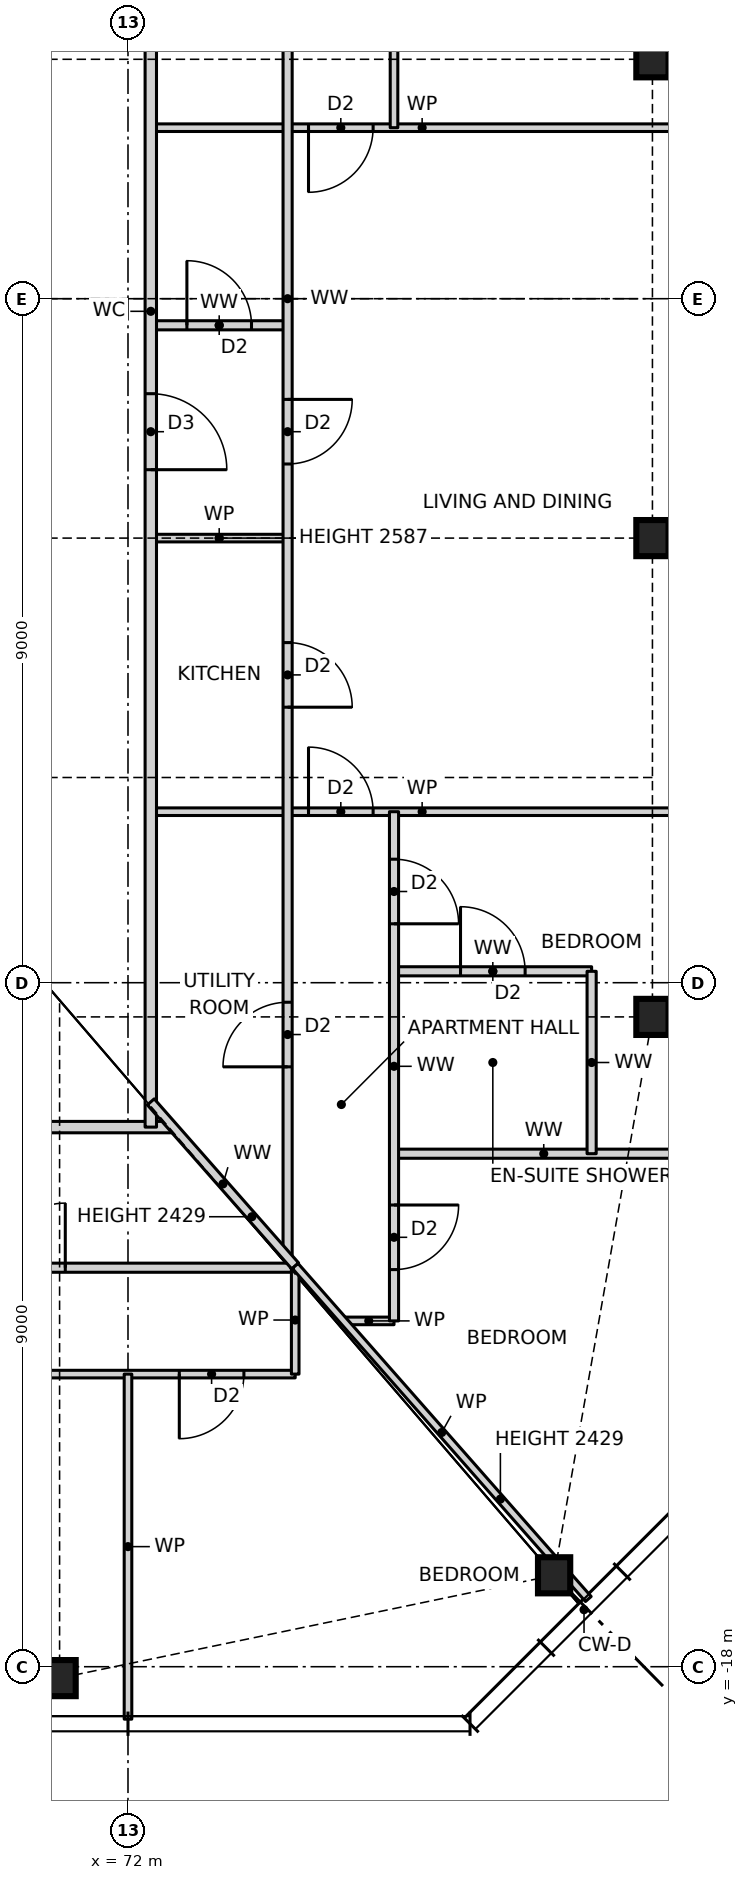
"""IFC4 building model, lengths in metres.
Left out: names, types, materials, properties, quantities, classifications, styles, units other than length and angle.
Written with IfcOpenShell. Run it as: python <this file> out.ifc"""

import sys

from ifc_helpers import new_model, si_unit, direction, frame, frame_2d, origin, origin_2d, place, context, subcontext, project, spatial, rectangle, i_section, extrude, element, fill, save


model = new_model("IFC4")
c1 = context("Model", 3, precision=1e-05, world=origin(), true_north=direction((0.0, 1.0)))
c2 = subcontext(c1, "Body", "Model", "MODEL_VIEW")
j1 = project(units=[si_unit("LENGTHUNIT", "METRE"), si_unit("PLANEANGLEUNIT", "RADIAN")], contexts=[c1])
p1 = place(None, origin())
s1 = spatial("IfcSite", under=j1, at=p1, CompositionType="ELEMENT")
p2 = place(p1, origin())
s2 = spatial("IfcBuilding", under=s1, at=p2, CompositionType="ELEMENT")
p3 = place(p2, frame((0.0, 0.0, 15.0)))
s3 = spatial("IfcBuildingStorey", under=s2, at=p3, CompositionType="ELEMENT", Elevation=15.0)
for number, where, z_axis, x_axis in (
    (1, (71.1, -18.15, 0.0), (0.0, 0.0, 1.0), (1.0, 0.0, 0.0)),
    (2, (77.606, -16.797, 0.0), (0.0, 0.0, 1.0), (1.0, 0.0, 0.0)),
    (3, (78.9, -9.45, 0.0), (0.0, 0.0, 1.0), (1.0, 0.0, 0.0)),
    (4, (78.9, -3.15, 0.0), (0.0, 0.0, 1.0), (1.0, 0.0, 0.0)),
    (5, (78.9, 3.15, 0.0), (0.0, 0.0, 1.0), (1.0, 0.0, 0.0)),
):
    element("IfcColumn", number, at=place(p3, frame(where, z_axis=z_axis, x_axis=x_axis)), inside=s3, PredefinedType="COLUMN", context=c2, shape_type="SweptSolid", body=[
        extrude(i_section(OverallWidth=0.424, OverallDepth=0.475, WebThickness=0.048, FlangeThickness=0.077, at=origin_2d()), origin(), (0.0, 0.0, 1.0), 3.5),
    ])
p4 = place(p3, frame((63.0, -14.15, 0.0), z_axis=(0.0, 0.0, 1.0), x_axis=(1.0, 0.0, 0.0)))
e6 = element("IfcWall", 6, at=p4, inside=s3, PredefinedType="PARTITIONING", context=c2, shape_type="SweptSolid", body=[
    extrude(rectangle(XDim=11.2, YDim=0.1, at=frame_2d((5.6, 0.0))), origin(), (0.0, 0.0, 1.0), 3.27),
])
p5 = place(p4, frame((1.825, 0.0, 0.0)))
e7 = element("IfcOpeningElement", 7, at=p5, cuts=e6, PredefinedType="OPENING", context=c2, shape_type="SweptSolid", body=[
    extrude(rectangle(XDim=0.85, YDim=2.1, at=frame_2d((0.425, 1.05))), frame((0.0, 0.06, 0.0), z_axis=(0.0, -1.0, 0.0), x_axis=(1.0, 0.0, 0.0)), (0.0, 0.0, 1.0), 0.12),
])
p6 = place(p4, frame((6.325, 0.0, 0.0)))
e8 = element("IfcOpeningElement", 8, at=p6, cuts=e6, PredefinedType="OPENING", context=c2, shape_type="SweptSolid", body=[
    extrude(rectangle(XDim=0.85, YDim=2.1, at=frame_2d((0.425, 1.05))), frame((0.0, 0.06, 0.0), z_axis=(0.0, -1.0, 0.0), x_axis=(1.0, 0.0, 0.0)), (0.0, 0.0, 1.0), 0.12),
])
p7 = place(p4, frame((9.675, 0.0, 0.0)))
e9 = element("IfcOpeningElement", 9, at=p7, cuts=e6, PredefinedType="OPENING", context=c2, shape_type="SweptSolid", body=[
    extrude(rectangle(XDim=0.85, YDim=2.1, at=frame_2d((0.425, 1.05))), frame((0.0, 0.06, 0.0), z_axis=(0.0, -1.0, 0.0), x_axis=(1.0, 0.0, 0.0)), (0.0, 0.0, 1.0), 0.12),
])
p8 = place(p3, frame((74.836, -13.45, 0.0), z_axis=(0.0, 0.0, 1.0), x_axis=(1.0, 0.0, 0.0)))
e10 = element("IfcWall", 10, at=p8, inside=s3, PredefinedType="PARTITIONING", context=c2, shape_type="SweptSolid", body=[
    extrude(rectangle(XDim=0.664, YDim=0.1, at=frame_2d((0.332, 0.0))), origin(), (0.0, 0.0, 1.0), 3.27),
])
p9 = place(p3, frame((54.0, -12.75, 0.0), z_axis=(0.0, 0.0, 1.0), x_axis=(1.0, 0.0, 0.0)))
e11 = element("IfcWall", 11, at=p9, inside=s3, PredefinedType="PARTITIONING", context=c2, shape_type="SweptSolid", body=[
    extrude(rectangle(XDim=20.2, YDim=0.12, at=frame_2d((10.1, 0.0))), origin(), (0.0, 0.0, 1.0), 3.27),
])
p10 = place(p9, frame((1.375, 0.0, 0.0)))
e12 = element("IfcOpeningElement", 12, at=p10, cuts=e11, PredefinedType="OPENING", context=c2, shape_type="SweptSolid", body=[
    extrude(rectangle(XDim=0.85, YDim=2.1, at=frame_2d((0.425, 1.05))), frame((0.0, 0.07, 0.0), z_axis=(0.0, -1.0, 0.0), x_axis=(1.0, 0.0, 0.0)), (0.0, 0.0, 1.0), 0.14),
])
p11 = place(p9, frame((4.575, 0.0, 0.0)))
e13 = element("IfcOpeningElement", 13, at=p11, cuts=e11, PredefinedType="OPENING", context=c2, shape_type="SweptSolid", body=[
    extrude(rectangle(XDim=0.85, YDim=2.1, at=frame_2d((0.425, 1.05))), frame((0.0, 0.07, 0.0), z_axis=(0.0, -1.0, 0.0), x_axis=(1.0, 0.0, 0.0)), (0.0, 0.0, 1.0), 0.14),
])
p12 = place(p9, frame((10.725, 0.0, 0.0)))
e14 = element("IfcOpeningElement", 14, at=p12, cuts=e11, PredefinedType="OPENING", context=c2, shape_type="SweptSolid", body=[
    extrude(rectangle(XDim=0.85, YDim=2.1, at=frame_2d((0.425, 1.05))), frame((0.0, 0.07, 0.0), z_axis=(0.0, -1.0, 0.0), x_axis=(1.0, 0.0, 0.0)), (0.0, 0.0, 1.0), 0.14),
])
p13 = place(p9, frame((16.325, 0.0, 0.0)))
e15 = element("IfcOpeningElement", 15, at=p13, cuts=e11, PredefinedType="OPENING", context=c2, shape_type="SweptSolid", body=[
    extrude(rectangle(XDim=0.85, YDim=2.1, at=frame_2d((0.425, 1.05))), frame((0.0, 0.07, 0.0), z_axis=(0.0, -1.0, 0.0), x_axis=(1.0, 0.0, 0.0)), (0.0, 0.0, 1.0), 0.14),
])
p14 = place(p3, frame((75.5, -11.25, 0.0), z_axis=(0.0, 0.0, 1.0), x_axis=(1.0, 0.0, 0.0)))
e16 = element("IfcWall", 16, at=p14, inside=s3, PredefinedType="PARTITIONING", context=c2, shape_type="SweptSolid", body=[
    extrude(rectangle(XDim=3.94, YDim=0.12, at=frame_2d((1.97, 0.0))), origin(), (0.0, 0.0, 1.0), 3.27),
])
p15 = place(p3, frame((53.408, -10.9, 0.0), z_axis=(0.0, 0.0, 1.0), x_axis=(1.0, 0.0, 0.0)))
e17 = element("IfcWall", 17, at=p15, inside=s3, PredefinedType="PARTITIONING", context=c2, shape_type="SweptSolid", body=[
    extrude(rectangle(XDim=19.184, YDim=0.15, at=frame_2d((9.592, 0.0))), origin(), (0.0, 0.0, 1.0), 3.27),
])
p16 = place(p15, frame((5.092, 0.0, 0.0)))
e18 = element("IfcOpeningElement", 18, at=p16, cuts=e17, PredefinedType="OPENING", context=c2, shape_type="SweptSolid", body=[
    extrude(rectangle(XDim=1.0, YDim=2.1, at=frame_2d((0.5, 1.05))), frame((0.0, 0.085, 0.0), z_axis=(0.0, -1.0, 0.0), x_axis=(1.0, 0.0, 0.0)), (0.0, 0.0, 1.0), 0.17),
])
p17 = place(p3, frame((75.5, -8.85, 0.0), z_axis=(0.0, 0.0, 1.0), x_axis=(1.0, 0.0, 0.0)))
e19 = element("IfcWall", 19, at=p17, inside=s3, PredefinedType="PARTITIONING", context=c2, shape_type="SweptSolid", body=[
    extrude(rectangle(XDim=2.6, YDim=0.12, at=frame_2d((1.3, 0.0))), origin(), (0.0, 0.0, 1.0), 3.27),
])
p18 = place(p17, frame((0.875, 0.0, 0.0)))
e20 = element("IfcOpeningElement", 20, at=p18, cuts=e19, PredefinedType="OPENING", context=c2, shape_type="SweptSolid", body=[
    extrude(rectangle(XDim=0.85, YDim=2.1, at=frame_2d((0.425, 1.05))), frame((0.0, 0.07, 0.0), z_axis=(0.0, -1.0, 0.0), x_axis=(1.0, 0.0, 0.0)), (0.0, 0.0, 1.0), 0.14),
])
p19 = place(p3, frame((72.3, -6.75, 0.0), z_axis=(0.0, 0.0, 1.0), x_axis=(1.0, 0.0, 0.0)))
e21 = element("IfcWall", 21, at=p19, inside=s3, PredefinedType="PARTITIONING", context=c2, shape_type="SweptSolid", body=[
    extrude(rectangle(XDim=7.14, YDim=0.1, at=frame_2d((3.57, 0.0))), origin(), (0.0, 0.0, 1.0), 3.27),
])
p20 = place(p19, frame((2.075, 0.0, 0.0)))
e22 = element("IfcOpeningElement", 22, at=p20, cuts=e21, PredefinedType="OPENING", context=c2, shape_type="SweptSolid", body=[
    extrude(rectangle(XDim=0.85, YDim=2.1, at=frame_2d((0.425, 1.05))), frame((0.0, 0.06, 0.0), z_axis=(0.0, -1.0, 0.0), x_axis=(1.0, 0.0, 0.0)), (0.0, 0.0, 1.0), 0.12),
])
p21 = place(p3, frame((72.3, -3.15, 0.0), z_axis=(0.0, 0.0, 1.0), x_axis=(1.0, 0.0, 0.0)))
e23 = element("IfcWall", 23, at=p21, inside=s3, PredefinedType="PARTITIONING", context=c2, shape_type="SweptSolid", body=[
    extrude(rectangle(XDim=1.8, YDim=0.1, at=frame_2d((0.9, 0.0))), origin(), (0.0, 0.0, 1.0), 2.587),
])
p22 = place(p3, frame((72.3, -0.35, 0.0), z_axis=(0.0, 0.0, 1.0), x_axis=(1.0, 0.0, 0.0)))
e24 = element("IfcWall", 24, at=p22, inside=s3, PredefinedType="PARTITIONING", context=c2, shape_type="SweptSolid", body=[
    extrude(rectangle(XDim=1.8, YDim=0.12, at=frame_2d((0.9, 0.0))), origin(), (0.0, 0.0, 1.0), 3.27),
])
p23 = place(p22, frame((0.475, 0.0, 0.0)))
e25 = element("IfcOpeningElement", 25, at=p23, cuts=e24, PredefinedType="OPENING", context=c2, shape_type="SweptSolid", body=[
    extrude(rectangle(XDim=0.85, YDim=2.1, at=frame_2d((0.425, 1.05))), frame((0.0, 0.07, 0.0), z_axis=(0.0, -1.0, 0.0), x_axis=(1.0, 0.0, 0.0)), (0.0, 0.0, 1.0), 0.14),
])
p24 = place(p3, frame((72.3, 2.25, 0.0), z_axis=(0.0, 0.0, 1.0), x_axis=(1.0, 0.0, 0.0)))
e26 = element("IfcWall", 26, at=p24, inside=s3, PredefinedType="PARTITIONING", context=c2, shape_type="SweptSolid", body=[
    extrude(rectangle(XDim=7.14, YDim=0.1, at=frame_2d((3.57, 0.0))), origin(), (0.0, 0.0, 1.0), 3.27),
])
p25 = place(p24, frame((2.075, 0.0, 0.0)))
e27 = element("IfcOpeningElement", 27, at=p25, cuts=e26, PredefinedType="OPENING", context=c2, shape_type="SweptSolid", body=[
    extrude(rectangle(XDim=0.85, YDim=2.1, at=frame_2d((0.425, 1.05))), frame((0.0, 0.06, 0.0), z_axis=(0.0, -1.0, 0.0), x_axis=(1.0, 0.0, 0.0)), (0.0, 0.0, 1.0), 0.12),
])
p26 = place(p3, frame((78.1, -11.25, 0.0), z_axis=(0.0, 0.0, 1.0), x_axis=(0.0, 1.0, 0.0)))
e28 = element("IfcWall", 28, at=p26, inside=s3, PredefinedType="PARTITIONING", context=c2, shape_type="SweptSolid", body=[
    extrude(rectangle(XDim=2.4, YDim=0.12, at=frame_2d((1.2, 0.0))), origin(), (0.0, 0.0, 1.0), 3.27),
])
p27 = place(p3, frame((75.5, -13.45, 0.0), z_axis=(0.0, 0.0, 1.0), x_axis=(0.0, 1.0, 0.0)))
e29 = element("IfcWall", 29, at=p27, inside=s3, PredefinedType="PARTITIONING", context=c2, shape_type="SweptSolid", body=[
    extrude(rectangle(XDim=6.7, YDim=0.12, at=frame_2d((3.35, 0.0))), origin(), (0.0, 0.0, 1.0), 3.27),
])
p28 = place(p27, frame((5.225, 0.0, 0.0)))
e30 = element("IfcOpeningElement", 30, at=p28, cuts=e29, PredefinedType="OPENING", context=c2, shape_type="SweptSolid", body=[
    extrude(rectangle(XDim=0.85, YDim=2.1, at=frame_2d((0.425, 1.05))), frame((0.0, 0.07, 0.0), z_axis=(0.0, -1.0, 0.0), x_axis=(1.0, 0.0, 0.0)), (0.0, 0.0, 1.0), 0.14),
])
p29 = place(p27, frame((0.675, 0.0, 0.0)))
e31 = element("IfcOpeningElement", 31, at=p29, cuts=e29, PredefinedType="OPENING", context=c2, shape_type="SweptSolid", body=[
    extrude(rectangle(XDim=0.85, YDim=2.1, at=frame_2d((0.425, 1.05))), frame((0.0, 0.07, 0.0), z_axis=(0.0, -1.0, 0.0), x_axis=(1.0, 0.0, 0.0)), (0.0, 0.0, 1.0), 0.14),
])
p30 = place(p3, frame((75.5, 2.25, 0.0), z_axis=(0.0, 0.0, 1.0), x_axis=(0.0, 1.0, 0.0)))
e32 = element("IfcWall", 32, at=p30, inside=s3, PredefinedType="PARTITIONING", context=c2, shape_type="SweptSolid", body=[
    extrude(rectangle(XDim=11.2, YDim=0.1, at=frame_2d((5.6, 0.0))), origin(), (0.0, 0.0, 1.0), 3.27),
])
p31 = place(p30, frame((1.825, 0.0, 0.0)))
e33 = element("IfcOpeningElement", 33, at=p31, cuts=e32, PredefinedType="OPENING", context=c2, shape_type="SweptSolid", body=[
    extrude(rectangle(XDim=0.85, YDim=2.1, at=frame_2d((0.425, 1.05))), frame((0.0, 0.06, 0.0), z_axis=(0.0, -1.0, 0.0), x_axis=(1.0, 0.0, 0.0)), (0.0, 0.0, 1.0), 0.12),
])
p32 = place(p30, frame((6.325, 0.0, 0.0)))
e34 = element("IfcOpeningElement", 34, at=p32, cuts=e32, PredefinedType="OPENING", context=c2, shape_type="SweptSolid", body=[
    extrude(rectangle(XDim=0.85, YDim=2.1, at=frame_2d((0.425, 1.05))), frame((0.0, 0.06, 0.0), z_axis=(0.0, -1.0, 0.0), x_axis=(1.0, 0.0, 0.0)), (0.0, 0.0, 1.0), 0.12),
])
p33 = place(p30, frame((9.675, 0.0, 0.0)))
e35 = element("IfcOpeningElement", 35, at=p33, cuts=e32, PredefinedType="OPENING", context=c2, shape_type="SweptSolid", body=[
    extrude(rectangle(XDim=0.85, YDim=2.1, at=frame_2d((0.425, 1.05))), frame((0.0, 0.06, 0.0), z_axis=(0.0, -1.0, 0.0), x_axis=(1.0, 0.0, 0.0)), (0.0, 0.0, 1.0), 0.12),
])
p34 = place(p3, frame((74.2, -14.15, 0.0), z_axis=(0.0, 0.0, 1.0), x_axis=(0.0, 1.0, 0.0)))
e36 = element("IfcWall", 36, at=p34, inside=s3, PredefinedType="PARTITIONING", context=c2, shape_type="SweptSolid", body=[
    extrude(rectangle(XDim=1.423, YDim=0.1, at=frame_2d((0.711, 0.0))), origin(), (0.0, 0.0, 1.0), 3.27),
])
p35 = place(p3, frame((74.1, -12.614, 0.0), z_axis=(0.0, 0.0, 1.0), x_axis=(0.0, 1.0, 0.0)))
e37 = element("IfcWall", 37, at=p35, inside=s3, PredefinedType="PARTITIONING", context=c2, shape_type="SweptSolid", body=[
    extrude(rectangle(XDim=25.228, YDim=0.12, at=frame_2d((12.614, 0.0))), origin(), (0.0, 0.0, 1.0), 3.27),
])
p36 = place(p35, frame((7.239, 0.0, 0.0)))
e38 = element("IfcOpeningElement", 38, at=p36, cuts=e37, PredefinedType="OPENING", context=c2, shape_type="SweptSolid", body=[
    extrude(rectangle(XDim=0.85, YDim=2.1, at=frame_2d((0.425, 1.05))), frame((0.0, 0.07, 0.0), z_axis=(0.0, -1.0, 0.0), x_axis=(1.0, 0.0, 0.0)), (0.0, 0.0, 1.0), 0.14),
])
p37 = place(p35, frame((10.439, 0.0, 0.0)))
e39 = element("IfcOpeningElement", 39, at=p37, cuts=e37, PredefinedType="OPENING", context=c2, shape_type="SweptSolid", body=[
    extrude(rectangle(XDim=0.85, YDim=2.1, at=frame_2d((0.425, 1.05))), frame((0.0, 0.07, 0.0), z_axis=(0.0, -1.0, 0.0), x_axis=(1.0, 0.0, 0.0)), (0.0, 0.0, 1.0), 0.14),
])
p38 = place(p35, frame((2.507, 0.0, 0.0)))
e40 = element("IfcOpeningElement", 40, at=p38, cuts=e37, PredefinedType="OPENING", context=c2, shape_type="SweptSolid", body=[
    extrude(rectangle(XDim=0.85, YDim=2.1, at=frame_2d((0.425, 1.05))), frame((0.0, 0.07, 0.0), z_axis=(0.0, -1.0, 0.0), x_axis=(1.0, 0.0, 0.0)), (0.0, 0.0, 1.0), 0.14),
])
p39 = place(p35, frame((16.639, 0.0, 0.0)))
e41 = element("IfcOpeningElement", 41, at=p39, cuts=e37, PredefinedType="OPENING", context=c2, shape_type="SweptSolid", body=[
    extrude(rectangle(XDim=0.85, YDim=2.1, at=frame_2d((0.425, 1.05))), frame((0.0, 0.07, 0.0), z_axis=(0.0, -1.0, 0.0), x_axis=(1.0, 0.0, 0.0)), (0.0, 0.0, 1.0), 0.14),
])
p40 = place(p35, frame((21.821, 0.0, 0.0)))
e42 = element("IfcOpeningElement", 42, at=p40, cuts=e37, PredefinedType="OPENING", context=c2, shape_type="SweptSolid", body=[
    extrude(rectangle(XDim=0.85, YDim=2.1, at=frame_2d((0.425, 1.05))), frame((0.0, 0.07, 0.0), z_axis=(0.0, -1.0, 0.0), x_axis=(1.0, 0.0, 0.0)), (0.0, 0.0, 1.0), 0.14),
])
p41 = place(p3, frame((72.3, -10.9, 0.0), z_axis=(0.0, 0.0, 1.0), x_axis=(0.0, 1.0, 0.0)))
e43 = element("IfcWall", 43, at=p41, inside=s3, PredefinedType="PARTITIONING", context=c2, shape_type="SweptSolid", body=[
    extrude(rectangle(XDim=21.468, YDim=0.15, at=frame_2d((10.734, 0.0))), origin(), (0.0, 0.0, 1.0), 3.27),
])
p42 = place(p41, frame((8.65, 0.0, 0.0)))
e44 = element("IfcOpeningElement", 44, at=p42, cuts=e43, PredefinedType="OPENING", context=c2, shape_type="SweptSolid", body=[
    extrude(rectangle(XDim=1.0, YDim=2.1, at=frame_2d((0.5, 1.05))), frame((0.0, 0.085, 0.0), z_axis=(0.0, -1.0, 0.0), x_axis=(1.0, 0.0, 0.0)), (0.0, 0.0, 1.0), 0.17),
])
p43 = place(p3, frame((72.0, -18.69, 0.0), z_axis=(0.0, 0.0, 1.0), x_axis=(0.0, 1.0, 0.0)))
e45 = element("IfcWall", 45, at=p43, inside=s3, PredefinedType="PARTITIONING", context=c2, shape_type="SweptSolid", body=[
    extrude(rectangle(XDim=4.54, YDim=0.1, at=frame_2d((2.27, 0.0))), origin(), (0.0, 0.0, 1.0), 3.27),
])
p44 = place(p3, frame((74.2, -12.727, 0.0), z_axis=(0.0, 0.0, 1.0), x_axis=(-0.66059344937, 0.75074382758, 0.0)))
e46 = element("IfcWall", 46, at=p44, inside=s3, PredefinedType="PARTITIONING", context=c2, shape_type="SweptSolid", body=[
    extrude(rectangle(XDim=2.876, YDim=0.12, at=frame_2d((1.438, 0.0))), origin(), (0.0, 0.0, 1.0), 2.429),
])
p45 = place(p3, frame((78.057, -17.109, 0.0), z_axis=(0.0, 0.0, 1.0), x_axis=(-0.660654290516, 0.750690287951, 0.0)))
e47 = element("IfcWall", 47, at=p45, inside=s3, PredefinedType="PARTITIONING", context=c2, shape_type="SweptSolid", body=[
    extrude(rectangle(XDim=5.838, YDim=0.1, at=frame_2d((2.919, 0.0))), origin(), (0.0, 0.0, 1.0), 2.429),
])
p46 = place(p7, frame((0.85, 0.0, 0.0), z_axis=(0.0, 0.0, 1.0), x_axis=(-1.0, 0.0, 0.0)))
e48 = element("IfcDoor", 48, at=p46, inside=s3, OperationType="SINGLE_SWING_RIGHT", PredefinedType="DOOR", context=c2, shape_type="SweptSolid", body=[
    extrude(rectangle(XDim=0.85, YDim=2.1, at=frame_2d((0.425, 1.05))), frame((0.0, 0.025, 0.0), z_axis=(0.0, -1.0, 0.0), x_axis=(1.0, 0.0, 0.0)), (0.0, 0.0, 1.0), 0.05),
])
fill(e9, e48)
p47 = place(p13, origin())
e49 = element("IfcDoor", 49, at=p47, inside=s3, OperationType="SINGLE_SWING_RIGHT", PredefinedType="DOOR", context=c2, shape_type="SweptSolid", body=[
    extrude(rectangle(XDim=0.85, YDim=2.1, at=frame_2d((0.425, 1.05))), frame((0.0, 0.025, 0.0), z_axis=(0.0, -1.0, 0.0), x_axis=(1.0, 0.0, 0.0)), (0.0, 0.0, 1.0), 0.05),
])
fill(e15, e49)
p48 = place(p36, frame((0.85, 0.0, 0.0), z_axis=(0.0, 0.0, 1.0), x_axis=(-1.0, 0.0, 0.0)))
e50 = element("IfcDoor", 50, at=p48, inside=s3, OperationType="SINGLE_SWING_RIGHT", PredefinedType="DOOR", context=c2, shape_type="SweptSolid", body=[
    extrude(rectangle(XDim=0.85, YDim=2.1, at=frame_2d((0.425, 1.05))), frame((0.0, 0.025, 0.0), z_axis=(0.0, -1.0, 0.0), x_axis=(1.0, 0.0, 0.0)), (0.0, 0.0, 1.0), 0.05),
])
fill(e38, e50)
p49 = place(p42, frame((1.0, 0.0, 0.0), z_axis=(0.0, 0.0, 1.0), x_axis=(-1.0, 0.0, 0.0)))
e51 = element("IfcDoor", 51, at=p49, inside=s3, OperationType="SINGLE_SWING_RIGHT", PredefinedType="DOOR", context=c2, shape_type="SweptSolid", body=[
    extrude(rectangle(XDim=1.0, YDim=2.1, at=frame_2d((0.5, 1.05))), frame((0.0, 0.025, 0.0), z_axis=(0.0, -1.0, 0.0), x_axis=(1.0, 0.0, 0.0)), (0.0, 0.0, 1.0), 0.05),
])
fill(e44, e51)
p50 = place(p37, frame((0.85, 0.0, 0.0), z_axis=(0.0, 0.0, 1.0), x_axis=(-1.0, 0.0, 0.0)))
e52 = element("IfcDoor", 52, at=p50, inside=s3, OperationType="SINGLE_SWING_LEFT", PredefinedType="DOOR", context=c2, shape_type="SweptSolid", body=[
    extrude(rectangle(XDim=0.85, YDim=2.1, at=frame_2d((0.425, 1.05))), frame((0.0, 0.025, 0.0), z_axis=(0.0, -1.0, 0.0), x_axis=(1.0, 0.0, 0.0)), (0.0, 0.0, 1.0), 0.05),
])
fill(e39, e52)
p51 = place(p23, origin())
e53 = element("IfcDoor", 53, at=p51, inside=s3, OperationType="SINGLE_SWING_LEFT", PredefinedType="DOOR", context=c2, shape_type="SweptSolid", body=[
    extrude(rectangle(XDim=0.85, YDim=2.1, at=frame_2d((0.425, 1.05))), frame((0.0, 0.025, 0.0), z_axis=(0.0, -1.0, 0.0), x_axis=(1.0, 0.0, 0.0)), (0.0, 0.0, 1.0), 0.05),
])
fill(e25, e53)
p52 = place(p20, origin())
e54 = element("IfcDoor", 54, at=p52, inside=s3, OperationType="SINGLE_SWING_LEFT", PredefinedType="DOOR", context=c2, shape_type="SweptSolid", body=[
    extrude(rectangle(XDim=0.85, YDim=2.1, at=frame_2d((0.425, 1.05))), frame((0.0, 0.025, 0.0), z_axis=(0.0, -1.0, 0.0), x_axis=(1.0, 0.0, 0.0)), (0.0, 0.0, 1.0), 0.05),
])
fill(e22, e54)
p53 = place(p18, origin())
e55 = element("IfcDoor", 55, at=p53, inside=s3, OperationType="SINGLE_SWING_LEFT", PredefinedType="DOOR", context=c2, shape_type="SweptSolid", body=[
    extrude(rectangle(XDim=0.85, YDim=2.1, at=frame_2d((0.425, 1.05))), frame((0.0, 0.025, 0.0), z_axis=(0.0, -1.0, 0.0), x_axis=(1.0, 0.0, 0.0)), (0.0, 0.0, 1.0), 0.05),
])
fill(e20, e55)
p54 = place(p28, frame((0.85, 0.0, 0.0), z_axis=(0.0, 0.0, 1.0), x_axis=(-1.0, 0.0, 0.0)))
e56 = element("IfcDoor", 56, at=p54, inside=s3, OperationType="SINGLE_SWING_RIGHT", PredefinedType="DOOR", context=c2, shape_type="SweptSolid", body=[
    extrude(rectangle(XDim=0.85, YDim=2.1, at=frame_2d((0.425, 1.05))), frame((0.0, 0.025, 0.0), z_axis=(0.0, -1.0, 0.0), x_axis=(1.0, 0.0, 0.0)), (0.0, 0.0, 1.0), 0.05),
])
fill(e30, e56)
p55 = place(p29, frame((0.85, 0.0, 0.0), z_axis=(0.0, 0.0, 1.0), x_axis=(-1.0, 0.0, 0.0)))
e57 = element("IfcDoor", 57, at=p55, inside=s3, OperationType="SINGLE_SWING_LEFT", PredefinedType="DOOR", context=c2, shape_type="SweptSolid", body=[
    extrude(rectangle(XDim=0.85, YDim=2.1, at=frame_2d((0.425, 1.05))), frame((0.0, 0.025, 0.0), z_axis=(0.0, -1.0, 0.0), x_axis=(1.0, 0.0, 0.0)), (0.0, 0.0, 1.0), 0.05),
])
fill(e31, e57)
p56 = place(p38, origin())
e58 = element("IfcDoor", 58, at=p56, inside=s3, OperationType="SINGLE_SWING_LEFT", PredefinedType="DOOR", context=c2, shape_type="SweptSolid", body=[
    extrude(rectangle(XDim=0.85, YDim=2.1, at=frame_2d((0.425, 1.05))), frame((0.0, 0.025, 0.0), z_axis=(0.0, -1.0, 0.0), x_axis=(1.0, 0.0, 0.0)), (0.0, 0.0, 1.0), 0.05),
])
fill(e40, e58)
p57 = place(p25, frame((0.85, 0.0, 0.0), z_axis=(0.0, 0.0, 1.0), x_axis=(-1.0, 0.0, 0.0)))
e59 = element("IfcDoor", 59, at=p57, inside=s3, OperationType="SINGLE_SWING_RIGHT", PredefinedType="DOOR", context=c2, shape_type="SweptSolid", body=[
    extrude(rectangle(XDim=0.85, YDim=2.1, at=frame_2d((0.425, 1.05))), frame((0.0, 0.025, 0.0), z_axis=(0.0, -1.0, 0.0), x_axis=(1.0, 0.0, 0.0)), (0.0, 0.0, 1.0), 0.05),
])
fill(e27, e59)
save(model, sys.argv[1])
